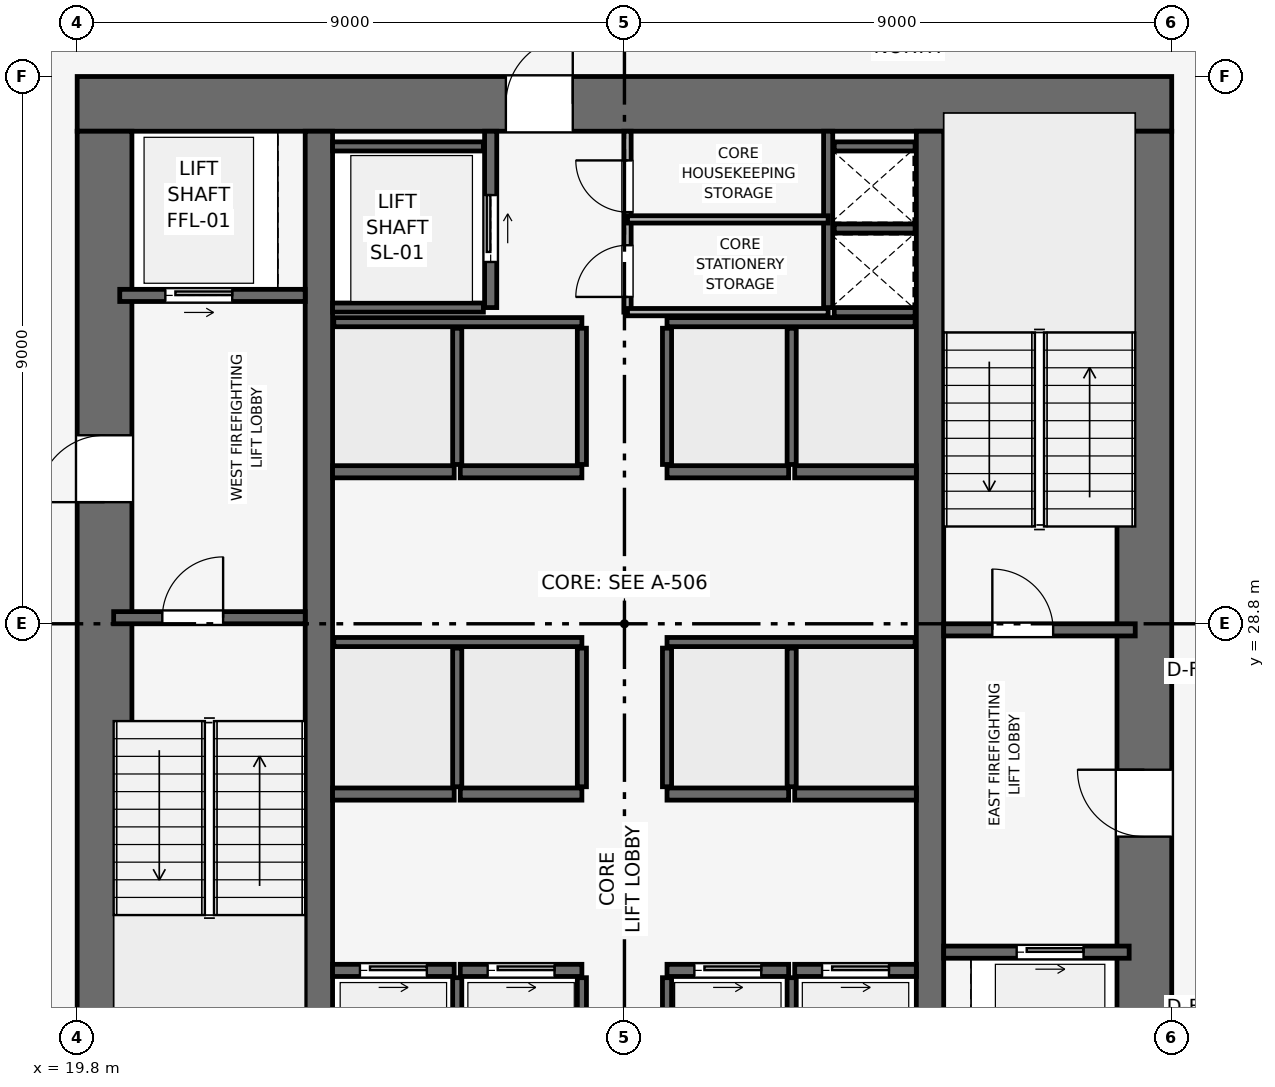
"""IFC4 building model, lengths in metres.
Left out: names, types, materials, properties, quantities, classifications, styles, units other than length and angle.
Written with IfcOpenShell. Run it as: python <this file> out.ifc"""

import sys

from ifc_helpers import new_model, si_unit, direction, frame, frame_2d, origin, place, context, subcontext, project, spatial, rectangle, extrude, element, fill, save


model = new_model("IFC4")
c1 = context("Model", 3, precision=1e-05, world=origin(), true_north=direction((0.0, 1.0)))
c2 = subcontext(c1, "Body", "Model", "MODEL_VIEW")
j1 = project(units=[si_unit("LENGTHUNIT", "METRE"), si_unit("PLANEANGLEUNIT", "RADIAN")], contexts=[c1])
p1 = place(None, origin())
s1 = spatial("IfcSite", under=j1, at=p1, CompositionType="ELEMENT")
p2 = place(p1, origin())
s2 = spatial("IfcBuilding", under=s1, at=p2, CompositionType="ELEMENT")
p3 = place(p2, frame((0.0, 0.0, 129.0)))
s3 = spatial("IfcBuildingStorey", under=s2, at=p3, CompositionType="ELEMENT", Elevation=129.0)
p4 = place(p3, frame((19.8, 37.35, 0.0), z_axis=(0.0, 0.0, 1.0), x_axis=(1.0, 0.0, 0.0)))
e1 = element("IfcWall", 1, at=p4, inside=s3, PredefinedType="SHEAR", context=c2, shape_type="SweptSolid", body=[
    extrude(rectangle(XDim=18.0, YDim=0.9, at=frame_2d((9.0, 0.0))), origin(), (0.0, 0.0, 1.0), 3.9),
])
p5 = place(p4, frame((7.05, 0.0, 0.0)))
e2 = element("IfcOpeningElement", 2, at=p5, cuts=e1, PredefinedType="OPENING", context=c2, shape_type="SweptSolid", body=[
    extrude(rectangle(XDim=1.1, YDim=2.15, at=frame_2d((0.55, 1.075))), frame((0.0, 0.46, 0.0), z_axis=(0.0, -1.0, 0.0), x_axis=(1.0, 0.0, 0.0)), (0.0, 0.0, 1.0), 0.92),
])
p6 = place(p3, frame((20.25, 20.7, 0.0), z_axis=(0.0, 0.0, 1.0), x_axis=(0.0, 1.0, 0.0)))
e3 = element("IfcWall", 3, at=p6, inside=s3, PredefinedType="SHEAR", context=c2, shape_type="SweptSolid", body=[
    extrude(rectangle(XDim=16.2, YDim=0.9, at=frame_2d((8.1, 0.0))), origin(), (0.0, 0.0, 1.0), 3.9),
])
p7 = place(p6, frame((10.1, 0.0, 0.0)))
e4 = element("IfcOpeningElement", 4, at=p7, cuts=e3, PredefinedType="OPENING", context=c2, shape_type="SweptSolid", body=[
    extrude(rectangle(XDim=1.1, YDim=2.15, at=frame_2d((0.55, 1.075))), frame((0.0, 0.46, 0.0), z_axis=(0.0, -1.0, 0.0), x_axis=(1.0, 0.0, 0.0)), (0.0, 0.0, 1.0), 0.92),
])
p8 = place(p3, frame((37.35, 20.7, 0.0), z_axis=(0.0, 0.0, 1.0), x_axis=(0.0, 1.0, 0.0)))
e5 = element("IfcWall", 5, at=p8, inside=s3, PredefinedType="SHEAR", context=c2, shape_type="SweptSolid", body=[
    extrude(rectangle(XDim=16.2, YDim=0.9, at=frame_2d((8.1, 0.0))), origin(), (0.0, 0.0, 1.0), 3.9),
])
p9 = place(p8, frame((4.6, 0.0, 0.0)))
e6 = element("IfcOpeningElement", 6, at=p9, cuts=e5, PredefinedType="OPENING", context=c2, shape_type="SweptSolid", body=[
    extrude(rectangle(XDim=1.1, YDim=2.15, at=frame_2d((0.55, 1.075))), frame((0.0, 0.46, 0.0), z_axis=(0.0, -1.0, 0.0), x_axis=(1.0, 0.0, 0.0)), (0.0, 0.0, 1.0), 0.92),
])
for number, where, z_axis, x_axis in (
    (7, (23.775, 20.7, 0.0), (0.0, 0.0, 1.0), (0.0, 1.0, 0.0)),
    (8, (33.825, 20.7, 0.0), (0.0, 0.0, 1.0), (0.0, 1.0, 0.0)),
):
    element("IfcWall", number, at=place(p3, frame(where, z_axis=z_axis, x_axis=x_axis)), inside=s3, PredefinedType="SHEAR", context=c2, shape_type="SweptSolid", body=[
        extrude(rectangle(XDim=16.2, YDim=0.45, at=frame_2d((8.1, 0.0))), origin(), (0.0, 0.0, 1.0), 3.9),
    ])
p10 = place(p3, frame((20.4, 28.9, 0.0), z_axis=(0.0, 0.0, 1.0), x_axis=(1.0, 0.0, 0.0)))
e9 = element("IfcWall", 9, at=p10, inside=s3, PredefinedType="SHEAR", context=c2, shape_type="SweptSolid", body=[
    extrude(rectangle(XDim=3.15, YDim=0.2, at=frame_2d((1.575, 0.0))), origin(), (0.0, 0.0, 1.0), 3.65),
])
p11 = place(p10, frame((0.8, 0.0, 0.0)))
e10 = element("IfcOpeningElement", 10, at=p11, cuts=e9, PredefinedType="OPENING", context=c2, shape_type="SweptSolid", body=[
    extrude(rectangle(XDim=1.0, YDim=2.1, at=frame_2d((0.5, 1.05))), frame((0.0, 0.11, 0.0), z_axis=(0.0, -1.0, 0.0), x_axis=(1.0, 0.0, 0.0)), (0.0, 0.0, 1.0), 0.22),
])
p12 = place(p3, frame((34.05, 28.7, 0.0), z_axis=(0.0, 0.0, 1.0), x_axis=(1.0, 0.0, 0.0)))
e11 = element("IfcWall", 11, at=p12, inside=s3, PredefinedType="SHEAR", context=c2, shape_type="SweptSolid", body=[
    extrude(rectangle(XDim=3.15, YDim=0.2, at=frame_2d((1.575, 0.0))), origin(), (0.0, 0.0, 1.0), 3.65),
])
p13 = place(p12, frame((0.8, 0.0, 0.0)))
e12 = element("IfcOpeningElement", 12, at=p13, cuts=e11, PredefinedType="OPENING", context=c2, shape_type="SweptSolid", body=[
    extrude(rectangle(XDim=1.0, YDim=2.1, at=frame_2d((0.5, 1.05))), frame((0.0, 0.11, 0.0), z_axis=(0.0, -1.0, 0.0), x_axis=(1.0, 0.0, 0.0)), (0.0, 0.0, 1.0), 0.22),
])
p14 = place(p3, frame((32.15, 34.0, 0.0), z_axis=(0.0, 0.0, 1.0), x_axis=(0.0, 1.0, 0.0)))
e13 = element("IfcWall", 13, at=p14, inside=s3, PredefinedType="SHEAR", context=c2, shape_type="SweptSolid", body=[
    extrude(rectangle(XDim=2.9, YDim=0.15, at=frame_2d((1.45, 0.0))), origin(), (0.0, 0.0, 1.0), 3.65),
])
for number, where, z_axis, x_axis in (
    (14, (32.25, 33.925, 0.0), (0.0, 0.0, 1.0), (1.0, 0.0, 0.0)),
    (15, (32.25, 35.3, 0.0), (0.0, 0.0, 1.0), (1.0, 0.0, 0.0)),
):
    element("IfcWall", number, at=place(p3, frame(where, z_axis=z_axis, x_axis=x_axis)), inside=s3, PredefinedType="SHEAR", context=c2, shape_type="SweptSolid", body=[
        extrude(rectangle(XDim=1.33, YDim=0.15, at=frame_2d((0.665, 0.0))), origin(), (0.0, 0.0, 1.0), 3.65),
    ])
p15 = place(p3, frame((20.5, 34.2, 0.0), z_axis=(0.0, 0.0, 1.0), x_axis=(1.0, 0.0, 0.0)))
e16 = element("IfcWall", 16, at=p15, inside=s3, PredefinedType="SHEAR", context=c2, shape_type="SweptSolid", body=[
    extrude(rectangle(XDim=3.05, YDim=0.2, at=frame_2d((1.525, 0.0))), origin(), (0.0, 0.0, 1.0), 3.65),
])
p16 = place(p15, frame((0.75, 0.0, 0.0)))
e17 = element("IfcOpeningElement", 17, at=p16, cuts=e16, PredefinedType="OPENING", context=c2, shape_type="SweptSolid", body=[
    extrude(rectangle(XDim=1.1, YDim=2.15, at=frame_2d((0.55, 1.075))), frame((0.0, 0.11, 0.0), z_axis=(0.0, -1.0, 0.0), x_axis=(1.0, 0.0, 0.0)), (0.0, 0.0, 1.0), 0.22),
])
p17 = place(p3, frame((34.05, 23.4, 0.0), z_axis=(0.0, 0.0, 1.0), x_axis=(1.0, 0.0, 0.0)))
e18 = element("IfcWall", 18, at=p17, inside=s3, PredefinedType="SHEAR", context=c2, shape_type="SweptSolid", body=[
    extrude(rectangle(XDim=3.05, YDim=0.2, at=frame_2d((1.525, 0.0))), origin(), (0.0, 0.0, 1.0), 3.65),
])
p18 = place(p17, frame((1.2, 0.0, 0.0)))
e19 = element("IfcOpeningElement", 19, at=p18, cuts=e18, PredefinedType="OPENING", context=c2, shape_type="SweptSolid", body=[
    extrude(rectangle(XDim=1.1, YDim=2.15, at=frame_2d((0.55, 1.075))), frame((0.0, 0.11, 0.0), z_axis=(0.0, -1.0, 0.0), x_axis=(1.0, 0.0, 0.0)), (0.0, 0.0, 1.0), 0.22),
])
p19 = place(p3, frame((26.6, 34.0, 0.0), z_axis=(0.0, 0.0, 1.0), x_axis=(0.0, 1.0, 0.0)))
e20 = element("IfcWall", 20, at=p19, inside=s3, PredefinedType="SHEAR", context=c2, shape_type="SweptSolid", body=[
    extrude(rectangle(XDim=2.9, YDim=0.2, at=frame_2d((1.45, 0.0))), origin(), (0.0, 0.0, 1.0), 3.65),
])
p20 = place(p19, frame((0.75, 0.0, 0.0)))
e21 = element("IfcOpeningElement", 21, at=p20, cuts=e20, PredefinedType="OPENING", context=c2, shape_type="SweptSolid", body=[
    extrude(rectangle(XDim=1.1, YDim=2.15, at=frame_2d((0.55, 1.075))), frame((0.0, 0.11, 0.0), z_axis=(0.0, -1.0, 0.0), x_axis=(1.0, 0.0, 0.0)), (0.0, 0.0, 1.0), 0.22),
])
for number, where, z_axis, x_axis in (
    (22, (24.0, 34.0, 0.0), (0.0, 0.0, 1.0), (1.0, 0.0, 0.0)),
    (23, (24.0, 36.65, 0.0), (0.0, 0.0, 1.0), (1.0, 0.0, 0.0)),
):
    element("IfcWall", number, at=place(p3, frame(where, z_axis=z_axis, x_axis=x_axis)), inside=s3, PredefinedType="SHEAR", context=c2, shape_type="SweptSolid", body=[
        extrude(rectangle(XDim=2.48, YDim=0.15, at=frame_2d((1.24, 0.0))), origin(), (0.0, 0.0, 1.0), 3.65),
    ])
p21 = place(p3, frame((24.0, 23.1, 0.0), z_axis=(0.0, 0.0, 1.0), x_axis=(1.0, 0.0, 0.0)))
e24 = element("IfcWall", 24, at=p21, inside=s3, PredefinedType="SHEAR", context=c2, shape_type="SweptSolid", body=[
    extrude(rectangle(XDim=2.0, YDim=0.2, at=frame_2d((1.0, 0.0))), origin(), (0.0, 0.0, 1.0), 3.65),
])
p22 = place(p21, frame((0.45, 0.0, 0.0)))
e25 = element("IfcOpeningElement", 25, at=p22, cuts=e24, PredefinedType="OPENING", context=c2, shape_type="SweptSolid", body=[
    extrude(rectangle(XDim=1.1, YDim=2.15, at=frame_2d((0.55, 1.075))), frame((0.0, 0.11, 0.0), z_axis=(0.0, -1.0, 0.0), x_axis=(1.0, 0.0, 0.0)), (0.0, 0.0, 1.0), 0.22),
])
p23 = place(p3, frame((26.1, 23.1, 0.0), z_axis=(0.0, 0.0, 1.0), x_axis=(1.0, 0.0, 0.0)))
e26 = element("IfcWall", 26, at=p23, inside=s3, PredefinedType="SHEAR", context=c2, shape_type="SweptSolid", body=[
    extrude(rectangle(XDim=2.0, YDim=0.2, at=frame_2d((1.0, 0.0))), origin(), (0.0, 0.0, 1.0), 3.65),
])
p24 = place(p23, frame((0.45, 0.0, 0.0)))
e27 = element("IfcOpeningElement", 27, at=p24, cuts=e26, PredefinedType="OPENING", context=c2, shape_type="SweptSolid", body=[
    extrude(rectangle(XDim=1.1, YDim=2.15, at=frame_2d((0.55, 1.075))), frame((0.0, 0.11, 0.0), z_axis=(0.0, -1.0, 0.0), x_axis=(1.0, 0.0, 0.0)), (0.0, 0.0, 1.0), 0.22),
])
p25 = place(p3, frame((29.5, 23.1, 0.0), z_axis=(0.0, 0.0, 1.0), x_axis=(1.0, 0.0, 0.0)))
e28 = element("IfcWall", 28, at=p25, inside=s3, PredefinedType="SHEAR", context=c2, shape_type="SweptSolid", body=[
    extrude(rectangle(XDim=2.0, YDim=0.2, at=frame_2d((1.0, 0.0))), origin(), (0.0, 0.0, 1.0), 3.65),
])
p26 = place(p25, frame((0.45, 0.0, 0.0)))
e29 = element("IfcOpeningElement", 29, at=p26, cuts=e28, PredefinedType="OPENING", context=c2, shape_type="SweptSolid", body=[
    extrude(rectangle(XDim=1.1, YDim=2.15, at=frame_2d((0.55, 1.075))), frame((0.0, 0.11, 0.0), z_axis=(0.0, -1.0, 0.0), x_axis=(1.0, 0.0, 0.0)), (0.0, 0.0, 1.0), 0.22),
])
p27 = place(p3, frame((31.6, 23.1, 0.0), z_axis=(0.0, 0.0, 1.0), x_axis=(1.0, 0.0, 0.0)))
e30 = element("IfcWall", 30, at=p27, inside=s3, PredefinedType="SHEAR", context=c2, shape_type="SweptSolid", body=[
    extrude(rectangle(XDim=2.0, YDim=0.2, at=frame_2d((1.0, 0.0))), origin(), (0.0, 0.0, 1.0), 3.65),
])
p28 = place(p27, frame((0.45, 0.0, 0.0)))
e31 = element("IfcOpeningElement", 31, at=p28, cuts=e30, PredefinedType="OPENING", context=c2, shape_type="SweptSolid", body=[
    extrude(rectangle(XDim=1.1, YDim=2.15, at=frame_2d((0.55, 1.075))), frame((0.0, 0.11, 0.0), z_axis=(0.0, -1.0, 0.0), x_axis=(1.0, 0.0, 0.0)), (0.0, 0.0, 1.0), 0.22),
])
for number, where, z_axis, x_axis in (
    (32, (24.0, 26.0, 0.0), (0.0, 0.0, 1.0), (1.0, 0.0, 0.0)),
    (33, (26.1, 26.0, 0.0), (0.0, 0.0, 1.0), (1.0, 0.0, 0.0)),
    (34, (29.5, 26.0, 0.0), (0.0, 0.0, 1.0), (1.0, 0.0, 0.0)),
    (35, (31.6, 26.0, 0.0), (0.0, 0.0, 1.0), (1.0, 0.0, 0.0)),
    (36, (24.0, 31.3, 0.0), (0.0, 0.0, 1.0), (1.0, 0.0, 0.0)),
    (37, (26.1, 31.3, 0.0), (0.0, 0.0, 1.0), (1.0, 0.0, 0.0)),
    (38, (29.5, 31.3, 0.0), (0.0, 0.0, 1.0), (1.0, 0.0, 0.0)),
    (39, (31.6, 31.3, 0.0), (0.0, 0.0, 1.0), (1.0, 0.0, 0.0)),
):
    element("IfcWall", number, at=place(p3, frame(where, z_axis=z_axis, x_axis=x_axis)), inside=s3, PredefinedType="SHEAR", context=c2, shape_type="SweptSolid", body=[
        extrude(rectangle(XDim=2.0, YDim=0.2, at=frame_2d((1.0, 0.0))), origin(), (0.0, 0.0, 1.0), 3.65),
    ])
p29 = place(p3, frame((32.25, 36.65, 0.0), z_axis=(0.0, 0.0, 1.0), x_axis=(1.0, 0.0, 0.0)))
e40 = element("IfcWall", 40, at=p29, inside=s3, PredefinedType="SHEAR", context=c2, shape_type="SweptSolid", body=[
    extrude(rectangle(XDim=1.33, YDim=0.15, at=frame_2d((0.665, 0.0))), origin(), (0.0, 0.0, 1.0), 3.65),
])
for number, where, z_axis, x_axis in (
    (41, (26.05, 20.72, 0.0), (0.0, 0.0, 1.0), (0.0, 1.0, 0.0)),
    (42, (28.1, 20.72, 0.0), (0.0, 0.0, 1.0), (0.0, 1.0, 0.0)),
    (43, (29.5, 20.72, 0.0), (0.0, 0.0, 1.0), (0.0, 1.0, 0.0)),
    (44, (31.55, 20.72, 0.0), (0.0, 0.0, 1.0), (0.0, 1.0, 0.0)),
):
    element("IfcWall", number, at=place(p3, frame(where, z_axis=z_axis, x_axis=x_axis)), inside=s3, PredefinedType="SHEAR", context=c2, shape_type="SweptSolid", body=[
        extrude(rectangle(XDim=2.26, YDim=0.15, at=frame_2d((1.13, 0.0))), origin(), (0.0, 0.0, 1.0), 3.65),
    ])
for number, where, z_axis, x_axis in (
    (45, (24.02, 28.5, 0.0), (0.0, 0.0, 1.0), (1.0, 0.0, 0.0)),
    (46, (29.5, 28.5, 0.0), (0.0, 0.0, 1.0), (1.0, 0.0, 0.0)),
):
    element("IfcWall", number, at=place(p3, frame(where, z_axis=z_axis, x_axis=x_axis)), inside=s3, PredefinedType="SHEAR", context=c2, shape_type="SweptSolid", body=[
        extrude(rectangle(XDim=4.08, YDim=0.15, at=frame_2d((2.04, 0.0))), origin(), (0.0, 0.0, 1.0), 3.65),
    ])
for number, where, z_axis, x_axis in (
    (47, (26.05, 26.12, 0.0), (0.0, 0.0, 1.0), (0.0, 1.0, 0.0)),
    (48, (28.1, 26.12, 0.0), (0.0, 0.0, 1.0), (0.0, 1.0, 0.0)),
    (49, (29.5, 26.12, 0.0), (0.0, 0.0, 1.0), (0.0, 1.0, 0.0)),
    (50, (31.55, 26.12, 0.0), (0.0, 0.0, 1.0), (0.0, 1.0, 0.0)),
):
    element("IfcWall", number, at=place(p3, frame(where, z_axis=z_axis, x_axis=x_axis)), inside=s3, PredefinedType="SHEAR", context=c2, shape_type="SweptSolid", body=[
        extrude(rectangle(XDim=2.28, YDim=0.15, at=frame_2d((1.14, 0.0))), origin(), (0.0, 0.0, 1.0), 3.65),
    ])
for number, where, z_axis, x_axis in (
    (51, (24.02, 33.76, 0.0), (0.0, 0.0, 1.0), (1.0, 0.0, 0.0)),
    (52, (29.5, 33.76, 0.0), (0.0, 0.0, 1.0), (1.0, 0.0, 0.0)),
):
    element("IfcWall", number, at=place(p3, frame(where, z_axis=z_axis, x_axis=x_axis)), inside=s3, PredefinedType="SHEAR", context=c2, shape_type="SweptSolid", body=[
        extrude(rectangle(XDim=4.08, YDim=0.15, at=frame_2d((2.04, 0.0))), origin(), (0.0, 0.0, 1.0), 3.65),
    ])
for number, where, z_axis, x_axis in (
    (53, (26.05, 31.42, 0.0), (0.0, 0.0, 1.0), (0.0, 1.0, 0.0)),
    (54, (28.1, 31.42, 0.0), (0.0, 0.0, 1.0), (0.0, 1.0, 0.0)),
    (55, (29.5, 31.42, 0.0), (0.0, 0.0, 1.0), (0.0, 1.0, 0.0)),
    (56, (31.55, 31.42, 0.0), (0.0, 0.0, 1.0), (0.0, 1.0, 0.0)),
):
    element("IfcWall", number, at=place(p3, frame(where, z_axis=z_axis, x_axis=x_axis)), inside=s3, PredefinedType="SHEAR", context=c2, shape_type="SweptSolid", body=[
        extrude(rectangle(XDim=2.24, YDim=0.15, at=frame_2d((1.12, 0.0))), origin(), (0.0, 0.0, 1.0), 3.65),
    ])
p30 = place(p3, frame((28.85, 33.925, 0.0), z_axis=(0.0, 0.0, 1.0), x_axis=(0.0, 1.0, 0.0)))
e57 = element("IfcWall", 57, at=p30, inside=s3, PredefinedType="PARTITIONING", context=c2, shape_type="SweptSolid", body=[
    extrude(rectangle(XDim=2.975, YDim=0.12, at=frame_2d((1.487, 0.0))), origin(), (0.0, 0.0, 1.0), 3.65),
])
p31 = place(p30, frame((0.25, 0.0, 0.0)))
e58 = element("IfcOpeningElement", 58, at=p31, cuts=e57, PredefinedType="OPENING", context=c2, shape_type="SweptSolid", body=[
    extrude(rectangle(XDim=0.85, YDim=2.1, at=frame_2d((0.425, 1.05))), frame((0.0, 0.07, 0.0), z_axis=(0.0, -1.0, 0.0), x_axis=(1.0, 0.0, 0.0)), (0.0, 0.0, 1.0), 0.14),
])
p32 = place(p30, frame((1.645, 0.0, 0.0)))
e59 = element("IfcOpeningElement", 59, at=p32, cuts=e57, PredefinedType="OPENING", context=c2, shape_type="SweptSolid", body=[
    extrude(rectangle(XDim=0.85, YDim=2.1, at=frame_2d((0.425, 1.05))), frame((0.0, 0.07, 0.0), z_axis=(0.0, -1.0, 0.0), x_axis=(1.0, 0.0, 0.0)), (0.0, 0.0, 1.0), 0.14),
])
for number, where, z_axis, x_axis in (
    (60, (28.85, 35.45, 0.0), (0.0, 0.0, 1.0), (1.0, 0.0, 0.0)),
    (61, (28.85, 33.925, 0.0), (0.0, 0.0, 1.0), (1.0, 0.0, 0.0)),
):
    element("IfcWall", number, at=place(p3, frame(where, z_axis=z_axis, x_axis=x_axis)), inside=s3, PredefinedType="PARTITIONING", context=c2, shape_type="SweptSolid", body=[
        extrude(rectangle(XDim=3.3, YDim=0.12, at=frame_2d((1.65, 0.0))), origin(), (0.0, 0.0, 1.0), 3.65),
    ])
p33 = place(p11, origin())
e62 = element("IfcDoor", 62, at=p33, inside=s3, OperationType="SINGLE_SWING_RIGHT", PredefinedType="DOOR", context=c2, shape_type="SweptSolid", body=[
    extrude(rectangle(XDim=1.0, YDim=2.1, at=frame_2d((0.5, 1.05))), frame((0.0, 0.025, 0.0), z_axis=(0.0, -1.0, 0.0), x_axis=(1.0, 0.0, 0.0)), (0.0, 0.0, 1.0), 0.05),
])
fill(e10, e62)
p34 = place(p13, origin())
e63 = element("IfcDoor", 63, at=p34, inside=s3, OperationType="SINGLE_SWING_LEFT", PredefinedType="DOOR", context=c2, shape_type="SweptSolid", body=[
    extrude(rectangle(XDim=1.0, YDim=2.1, at=frame_2d((0.5, 1.05))), frame((0.0, 0.025, 0.0), z_axis=(0.0, -1.0, 0.0), x_axis=(1.0, 0.0, 0.0)), (0.0, 0.0, 1.0), 0.05),
])
fill(e12, e63)
p35 = place(p16, origin())
e64 = element("IfcDoor", 64, at=p35, inside=s3, OperationType="SLIDING_TO_RIGHT", PredefinedType="DOOR", context=c2, shape_type="SweptSolid", body=[
    extrude(rectangle(XDim=1.1, YDim=2.15, at=frame_2d((0.55, 1.075))), frame((0.0, 0.025, 0.0), z_axis=(0.0, -1.0, 0.0), x_axis=(1.0, 0.0, 0.0)), (0.0, 0.0, 1.0), 0.05),
])
fill(e17, e64)
p36 = place(p18, origin())
e65 = element("IfcDoor", 65, at=p36, inside=s3, OperationType="SLIDING_TO_RIGHT", PredefinedType="DOOR", context=c2, shape_type="SweptSolid", body=[
    extrude(rectangle(XDim=1.1, YDim=2.15, at=frame_2d((0.55, 1.075))), frame((0.0, 0.025, 0.0), z_axis=(0.0, -1.0, 0.0), x_axis=(1.0, 0.0, 0.0)), (0.0, 0.0, 1.0), 0.05),
])
fill(e19, e65)
p37 = place(p20, origin())
e66 = element("IfcDoor", 66, at=p37, inside=s3, OperationType="SLIDING_TO_RIGHT", PredefinedType="DOOR", context=c2, shape_type="SweptSolid", body=[
    extrude(rectangle(XDim=1.1, YDim=2.15, at=frame_2d((0.55, 1.075))), frame((0.0, 0.025, 0.0), z_axis=(0.0, -1.0, 0.0), x_axis=(1.0, 0.0, 0.0)), (0.0, 0.0, 1.0), 0.05),
])
fill(e21, e66)
p38 = place(p22, origin())
e67 = element("IfcDoor", 67, at=p38, inside=s3, OperationType="SLIDING_TO_RIGHT", PredefinedType="DOOR", context=c2, shape_type="SweptSolid", body=[
    extrude(rectangle(XDim=1.1, YDim=2.15, at=frame_2d((0.55, 1.075))), frame((0.0, 0.025, 0.0), z_axis=(0.0, -1.0, 0.0), x_axis=(1.0, 0.0, 0.0)), (0.0, 0.0, 1.0), 0.05),
])
fill(e25, e67)
p39 = place(p24, origin())
e68 = element("IfcDoor", 68, at=p39, inside=s3, OperationType="SLIDING_TO_RIGHT", PredefinedType="DOOR", context=c2, shape_type="SweptSolid", body=[
    extrude(rectangle(XDim=1.1, YDim=2.15, at=frame_2d((0.55, 1.075))), frame((0.0, 0.025, 0.0), z_axis=(0.0, -1.0, 0.0), x_axis=(1.0, 0.0, 0.0)), (0.0, 0.0, 1.0), 0.05),
])
fill(e27, e68)
p40 = place(p26, origin())
e69 = element("IfcDoor", 69, at=p40, inside=s3, OperationType="SLIDING_TO_RIGHT", PredefinedType="DOOR", context=c2, shape_type="SweptSolid", body=[
    extrude(rectangle(XDim=1.1, YDim=2.15, at=frame_2d((0.55, 1.075))), frame((0.0, 0.025, 0.0), z_axis=(0.0, -1.0, 0.0), x_axis=(1.0, 0.0, 0.0)), (0.0, 0.0, 1.0), 0.05),
])
fill(e29, e69)
p41 = place(p28, origin())
e70 = element("IfcDoor", 70, at=p41, inside=s3, OperationType="SLIDING_TO_RIGHT", PredefinedType="DOOR", context=c2, shape_type="SweptSolid", body=[
    extrude(rectangle(XDim=1.1, YDim=2.15, at=frame_2d((0.55, 1.075))), frame((0.0, 0.025, 0.0), z_axis=(0.0, -1.0, 0.0), x_axis=(1.0, 0.0, 0.0)), (0.0, 0.0, 1.0), 0.05),
])
fill(e31, e70)
p42 = place(p31, origin())
e71 = element("IfcDoor", 71, at=p42, inside=s3, OperationType="SINGLE_SWING_LEFT", PredefinedType="DOOR", context=c2, shape_type="SweptSolid", body=[
    extrude(rectangle(XDim=0.85, YDim=2.1, at=frame_2d((0.425, 1.05))), frame((0.0, 0.025, 0.0), z_axis=(0.0, -1.0, 0.0), x_axis=(1.0, 0.0, 0.0)), (0.0, 0.0, 1.0), 0.05),
])
fill(e58, e71)
p43 = place(p32, origin())
e72 = element("IfcDoor", 72, at=p43, inside=s3, OperationType="SINGLE_SWING_RIGHT", PredefinedType="DOOR", context=c2, shape_type="SweptSolid", body=[
    extrude(rectangle(XDim=0.85, YDim=2.1, at=frame_2d((0.425, 1.05))), frame((0.0, 0.025, 0.0), z_axis=(0.0, -1.0, 0.0), x_axis=(1.0, 0.0, 0.0)), (0.0, 0.0, 1.0), 0.05),
])
fill(e59, e72)
p44 = place(p7, origin())
e73 = element("IfcDoor", 73, at=p44, inside=s3, OperationType="SINGLE_SWING_LEFT", PredefinedType="DOOR", context=c2, shape_type="SweptSolid", body=[
    extrude(rectangle(XDim=1.1, YDim=2.15, at=frame_2d((0.55, 1.075))), frame((0.0, 0.025, 0.0), z_axis=(0.0, -1.0, 0.0), x_axis=(1.0, 0.0, 0.0)), (0.0, 0.0, 1.0), 0.05),
])
fill(e4, e73)
p45 = place(p9, origin())
e74 = element("IfcDoor", 74, at=p45, inside=s3, OperationType="SINGLE_SWING_RIGHT", PredefinedType="DOOR", context=c2, shape_type="SweptSolid", body=[
    extrude(rectangle(XDim=1.1, YDim=2.15, at=frame_2d((0.55, 1.075))), frame((0.0, 0.025, 0.0), z_axis=(0.0, -1.0, 0.0), x_axis=(1.0, 0.0, 0.0)), (0.0, 0.0, 1.0), 0.05),
])
fill(e6, e74)
p46 = place(p5, origin())
e75 = element("IfcDoor", 75, at=p46, inside=s3, OperationType="SINGLE_SWING_RIGHT", PredefinedType="DOOR", context=c2, shape_type="SweptSolid", body=[
    extrude(rectangle(XDim=1.1, YDim=2.15, at=frame_2d((0.55, 1.075))), frame((0.0, 0.025, 0.0), z_axis=(0.0, -1.0, 0.0), x_axis=(1.0, 0.0, 0.0)), (0.0, 0.0, 1.0), 0.05),
])
fill(e2, e75)
save(model, sys.argv[1])
